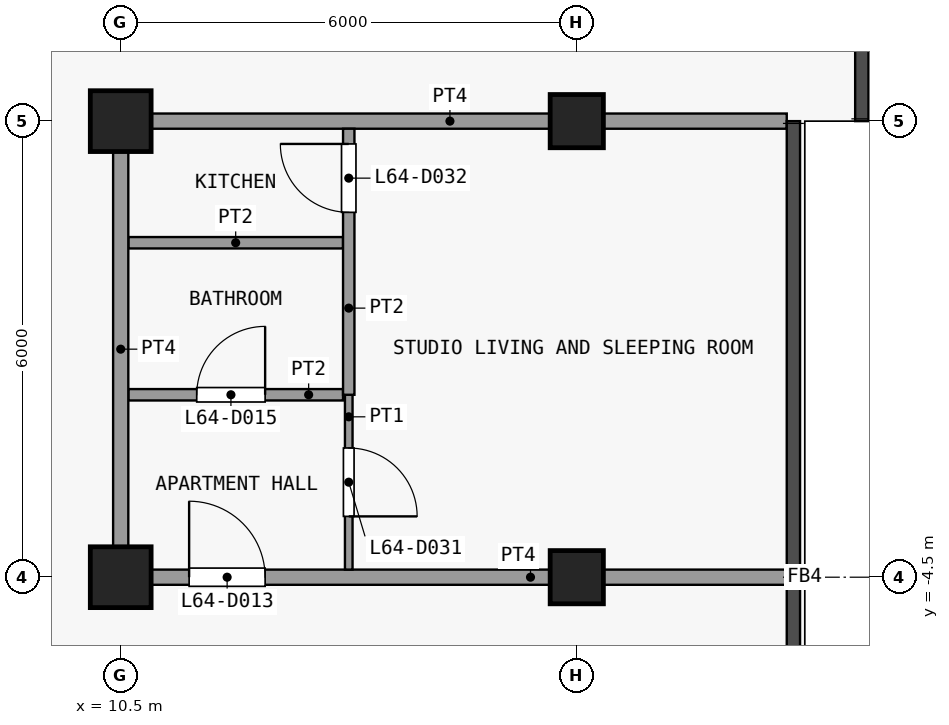
"""IFC4 building model, lengths in metres.
Left out: names, types, materials, properties, quantities, classifications, styles, units other than length and angle.
Written with IfcOpenShell. Run it as: python <this file> out.ifc"""

import sys

from ifc_helpers import new_model, si_unit, direction, frame, frame_2d, origin, origin_2d, place, context, subcontext, project, spatial, rectangle, extrude, element, fill, save


model = new_model("IFC4")
c1 = context("Model", 3, precision=1e-05, world=origin(), true_north=direction((0.0, 1.0)))
c2 = subcontext(c1, "Body", "Model", "MODEL_VIEW")
j1 = project(units=[si_unit("LENGTHUNIT", "METRE"), si_unit("PLANEANGLEUNIT", "RADIAN")], contexts=[c1])
p1 = place(None, origin())
s1 = spatial("IfcSite", under=j1, at=p1, CompositionType="ELEMENT")
p2 = place(p1, origin())
s2 = spatial("IfcBuilding", under=s1, at=p2, CompositionType="ELEMENT")
p3 = place(p2, frame((0.0, 0.0, 255.5)))
s3 = spatial("IfcBuildingStorey", under=s2, at=p3, CompositionType="ELEMENT", Elevation=255.5)
for number, where, z_axis, x_axis in (
    (1, (10.5, -4.5, 0.0), (0.0, 0.0, 1.0), (1.0, 0.0, 0.0)),
    (2, (10.5, 1.5, 0.0), (0.0, 0.0, 1.0), (1.0, 0.0, 0.0)),
):
    element("IfcColumn", number, at=place(p3, frame(where, z_axis=z_axis, x_axis=x_axis)), inside=s3, PredefinedType="COLUMN", context=c2, shape_type="SweptSolid", body=[
        extrude(rectangle(XDim=0.8, YDim=0.8, at=origin_2d()), origin(), (0.0, 0.0, 1.0), 3.6),
    ])
for number, where, z_axis, x_axis in (
    (3, (16.5, -4.5, 0.0), (0.0, 0.0, 1.0), (1.0, 0.0, 0.0)),
    (4, (16.5, 1.5, 0.0), (0.0, 0.0, 1.0), (1.0, 0.0, 0.0)),
):
    element("IfcColumn", number, at=place(p3, frame(where, z_axis=z_axis, x_axis=x_axis)), inside=s3, PredefinedType="COLUMN", context=c2, shape_type="SweptSolid", body=[
        extrude(rectangle(XDim=0.7, YDim=0.7, at=origin_2d()), origin(), (0.0, 0.0, 1.0), 3.6),
    ])
p4 = place(p3, frame((10.4, -4.5, 0.0), z_axis=(0.0, 0.0, 1.0), x_axis=(1.0, 0.0, 0.0)))
e5 = element("IfcWall", 5, at=p4, inside=s3, PredefinedType="PARTITIONING", context=c2, shape_type="SweptSolid", body=[
    extrude(rectangle(XDim=8.863, YDim=0.2, at=frame_2d((4.431, 0.0))), origin(), (0.0, 0.0, 1.0), 3.3),
])
p5 = place(p4, frame((1.0, 0.0, 0.0)))
e6 = element("IfcOpeningElement", 6, at=p5, cuts=e5, PredefinedType="OPENING", context=c2, shape_type="SweptSolid", body=[
    extrude(rectangle(XDim=1.0, YDim=2.1, at=frame_2d((0.5, 1.05))), frame((0.0, 0.11, 0.0), z_axis=(0.0, -1.0, 0.0), x_axis=(1.0, 0.0, 0.0)), (0.0, 0.0, 1.0), 0.22),
])
p6 = place(p3, frame((10.6, -2.1, 0.0), z_axis=(0.0, 0.0, 1.0), x_axis=(1.0, 0.0, 0.0)))
e7 = element("IfcWall", 7, at=p6, inside=s3, PredefinedType="PARTITIONING", context=c2, shape_type="SweptSolid", body=[
    extrude(rectangle(XDim=2.825, YDim=0.15, at=frame_2d((1.413, 0.0))), origin(), (0.0, 0.0, 1.0), 3.3),
])
p7 = place(p6, frame((0.9, 0.0, 0.0)))
e8 = element("IfcOpeningElement", 8, at=p7, cuts=e7, PredefinedType="OPENING", context=c2, shape_type="SweptSolid", body=[
    extrude(rectangle(XDim=0.9, YDim=2.1, at=frame_2d((0.45, 1.05))), frame((0.0, 0.085, 0.0), z_axis=(0.0, -1.0, 0.0), x_axis=(1.0, 0.0, 0.0)), (0.0, 0.0, 1.0), 0.17),
])
p8 = place(p3, frame((10.6, -0.1, 0.0), z_axis=(0.0, 0.0, 1.0), x_axis=(1.0, 0.0, 0.0)))
e9 = element("IfcWall", 9, at=p8, inside=s3, PredefinedType="PARTITIONING", context=c2, shape_type="SweptSolid", body=[
    extrude(rectangle(XDim=2.825, YDim=0.15, at=frame_2d((1.413, 0.0))), origin(), (0.0, 0.0, 1.0), 3.3),
])
p9 = place(p3, frame((10.4, 1.5, 0.0), z_axis=(0.0, 0.0, 1.0), x_axis=(1.0, 0.0, 0.0)))
e10 = element("IfcWall", 10, at=p9, inside=s3, PredefinedType="PARTITIONING", context=c2, shape_type="SweptSolid", body=[
    extrude(rectangle(XDim=8.863, YDim=0.2, at=frame_2d((4.431, 0.0))), origin(), (0.0, 0.0, 1.0), 3.3),
])
p10 = place(p3, frame((10.5, -4.4, 0.0), z_axis=(0.0, 0.0, 1.0), x_axis=(0.0, 1.0, 0.0)))
e11 = element("IfcWall", 11, at=p10, inside=s3, PredefinedType="PARTITIONING", context=c2, shape_type="SweptSolid", body=[
    extrude(rectangle(XDim=5.8, YDim=0.2, at=frame_2d((2.9, 0.0))), origin(), (0.0, 0.0, 1.0), 3.3),
])
p11 = place(p3, frame((13.5, -4.4, 0.0), z_axis=(0.0, 0.0, 1.0), x_axis=(0.0, 1.0, 0.0)))
e12 = element("IfcWall", 12, at=p11, inside=s3, PredefinedType="PARTITIONING", context=c2, shape_type="SweptSolid", body=[
    extrude(rectangle(XDim=2.3, YDim=0.1, at=frame_2d((1.15, 0.0))), origin(), (0.0, 0.0, 1.0), 3.3),
])
p12 = place(p11, frame((0.7, 0.0, 0.0)))
e13 = element("IfcOpeningElement", 13, at=p12, cuts=e12, PredefinedType="OPENING", context=c2, shape_type="SweptSolid", body=[
    extrude(rectangle(XDim=0.9, YDim=2.1, at=frame_2d((0.45, 1.05))), frame((0.0, 0.06, 0.0), z_axis=(0.0, -1.0, 0.0), x_axis=(1.0, 0.0, 0.0)), (0.0, 0.0, 1.0), 0.12),
])
p13 = place(p3, frame((13.5, -2.1, 0.0), z_axis=(0.0, 0.0, 1.0), x_axis=(0.0, 1.0, 0.0)))
e14 = element("IfcWall", 14, at=p13, inside=s3, PredefinedType="PARTITIONING", context=c2, shape_type="SweptSolid", body=[
    extrude(rectangle(XDim=3.5, YDim=0.15, at=frame_2d((1.75, 0.0))), origin(), (0.0, 0.0, 1.0), 3.3),
])
p14 = place(p13, frame((2.4, 0.0, 0.0)))
e15 = element("IfcOpeningElement", 15, at=p14, cuts=e14, PredefinedType="OPENING", context=c2, shape_type="SweptSolid", body=[
    extrude(rectangle(XDim=0.9, YDim=2.1, at=frame_2d((0.45, 1.05))), frame((0.0, 0.085, 0.0), z_axis=(0.0, -1.0, 0.0), x_axis=(1.0, 0.0, 0.0)), (0.0, 0.0, 1.0), 0.17),
])
p15 = place(p5, origin())
e16 = element("IfcDoor", 16, at=p15, inside=s3, OperationType="SINGLE_SWING_RIGHT", PredefinedType="DOOR", context=c2, shape_type="SweptSolid", body=[
    extrude(rectangle(XDim=1.0, YDim=2.1, at=frame_2d((0.5, 1.05))), frame((0.0, 0.025, 0.0), z_axis=(0.0, -1.0, 0.0), x_axis=(1.0, 0.0, 0.0)), (0.0, 0.0, 1.0), 0.05),
])
fill(e6, e16)
p16 = place(p7, origin())
e17 = element("IfcDoor", 17, at=p16, inside=s3, OperationType="SINGLE_SWING_LEFT", PredefinedType="DOOR", context=c2, shape_type="SweptSolid", body=[
    extrude(rectangle(XDim=0.9, YDim=2.1, at=frame_2d((0.45, 1.05))), frame((0.0, 0.025, 0.0), z_axis=(0.0, -1.0, 0.0), x_axis=(1.0, 0.0, 0.0)), (0.0, 0.0, 1.0), 0.05),
])
fill(e8, e17)
p17 = place(p12, origin())
e18 = element("IfcDoor", 18, at=p17, inside=s3, OperationType="SINGLE_SWING_LEFT", PredefinedType="DOOR", context=c2, shape_type="SweptSolid", body=[
    extrude(rectangle(XDim=0.9, YDim=2.1, at=frame_2d((0.45, 1.05))), frame((0.0, 0.025, 0.0), z_axis=(0.0, -1.0, 0.0), x_axis=(1.0, 0.0, 0.0)), (0.0, 0.0, 1.0), 0.05),
])
fill(e13, e18)
p18 = place(p14, origin())
e19 = element("IfcDoor", 19, at=p18, inside=s3, OperationType="SINGLE_SWING_LEFT", PredefinedType="DOOR", context=c2, shape_type="SweptSolid", body=[
    extrude(rectangle(XDim=0.9, YDim=2.1, at=frame_2d((0.45, 1.05))), frame((0.0, 0.025, 0.0), z_axis=(0.0, -1.0, 0.0), x_axis=(1.0, 0.0, 0.0)), (0.0, 0.0, 1.0), 0.05),
])
fill(e15, e19)
save(model, sys.argv[1])
